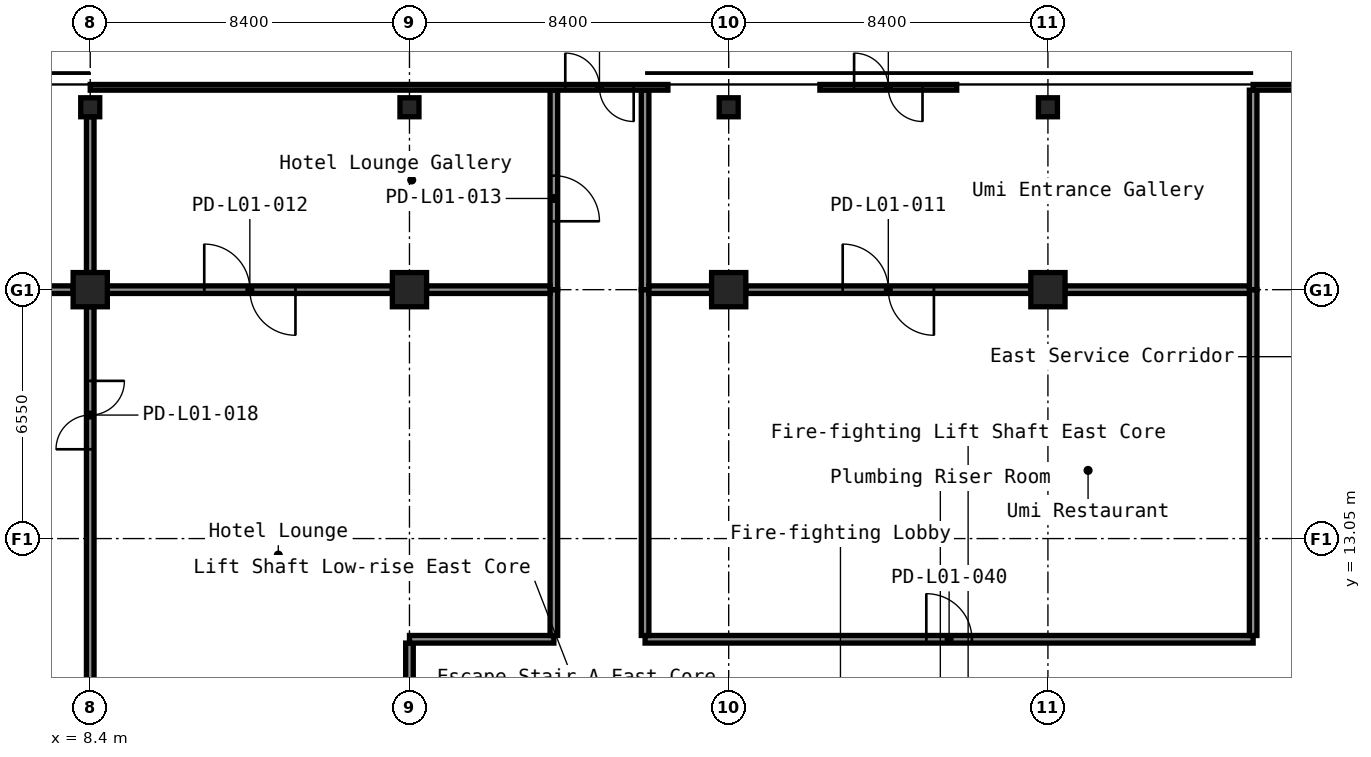
"""IFC4 building model, lengths in metres.
Left out: names, types, materials, properties, quantities, classifications, styles, units other than length and angle.
Written with IfcOpenShell. Run it as: python <this file> out.ifc"""

import sys

from ifc_helpers import new_model, si_unit, direction, frame, frame_2d, origin, origin_2d, place, context, subcontext, project, spatial, rectangle, hollow_rectangle, extrude, element, fill, save


model = new_model("IFC4")
c1 = context("Model", 3, precision=1e-05, world=origin(), true_north=direction((0.0, 1.0)))
c2 = subcontext(c1, "Body", "Model", "MODEL_VIEW")
j1 = project(units=[si_unit("LENGTHUNIT", "METRE"), si_unit("PLANEANGLEUNIT", "RADIAN")], contexts=[c1])
p1 = place(None, origin())
s1 = spatial("IfcSite", under=j1, at=p1, CompositionType="ELEMENT")
p2 = place(p1, origin())
s2 = spatial("IfcBuilding", under=s1, at=p2, CompositionType="ELEMENT")
p3 = place(p2, origin())
s3 = spatial("IfcBuildingStorey", under=s2, at=p3, CompositionType="ELEMENT", Elevation=0.0)
for number, where, z_axis, x_axis in (
    (1, (8.4, 19.6, -0.3), (0.0, 0.0, 1.0), (1.0, 0.0, 0.0)),
    (2, (16.8, 19.6, -0.3), (0.0, 0.0, 1.0), (1.0, 0.0, 0.0)),
    (3, (25.2, 19.6, -0.3), (0.0, 0.0, 1.0), (1.0, 0.0, 0.0)),
    (4, (33.6, 19.6, -0.3), (0.0, 0.0, 1.0), (1.0, 0.0, 0.0)),
):
    element("IfcColumn", number, at=place(p3, frame(where, z_axis=z_axis, x_axis=x_axis)), inside=s3, PredefinedType="COLUMN", context=c2, shape_type="SweptSolid", body=[
        extrude(hollow_rectangle(XDim=0.9, YDim=0.9, WallThickness=0.036, at=origin_2d()), origin(), (0.0, 0.0, 1.0), 8.9),
    ])
for number, where, z_axis, x_axis in (
    (5, (8.4, 24.4, -0.3), (0.0, 0.0, 1.0), (1.0, 0.0, 0.0)),
    (6, (16.8, 24.4, -0.3), (0.0, 0.0, 1.0), (1.0, 0.0, 0.0)),
    (7, (25.2, 24.4, -0.3), (0.0, 0.0, 1.0), (1.0, 0.0, 0.0)),
    (8, (33.6, 24.4, -0.3), (0.0, 0.0, 1.0), (1.0, 0.0, 0.0)),
):
    element("IfcColumn", number, at=place(p3, frame(where, z_axis=z_axis, x_axis=x_axis)), inside=s3, PredefinedType="COLUMN", context=c2, shape_type="SweptSolid", body=[
        extrude(hollow_rectangle(XDim=0.5, YDim=0.5, WallThickness=0.019, InnerFilletRadius=0.029, OuterFilletRadius=0.048, at=origin_2d()), origin(), (0.0, 0.0, 1.0), 8.9),
    ])
p4 = place(p3, frame((8.4, 24.15, 0.0), z_axis=(0.0, 0.0, 1.0), x_axis=(0.0, -1.0, 0.0)))
e9 = element("IfcWall", 9, at=p4, inside=s3, PredefinedType="PARTITIONING", context=c2, shape_type="SweptSolid", body=[
    extrude(rectangle(XDim=4.1, YDim=0.2, at=frame_2d((2.05, 0.0))), origin(), (0.0, 0.0, 1.0), 8.6),
])
p5 = place(p3, frame((16.8, 8.4, 0.0), z_axis=(0.0, 0.0, 1.0), x_axis=(0.0, 1.0, 0.0)))
e10 = element("IfcWall", 10, at=p5, inside=s3, PredefinedType="PARTITIONING", context=c2, shape_type="SweptSolid", body=[
    extrude(rectangle(XDim=1.9, YDim=0.2, at=frame_2d((0.95, 0.0))), origin(), (0.0, 0.0, 1.0), 8.6),
])
p6 = place(p3, frame((16.8, 10.4, 0.0), z_axis=(0.0, 0.0, 1.0), x_axis=(1.0, 0.0, 0.0)))
e11 = element("IfcWall", 11, at=p6, inside=s3, PredefinedType="PARTITIONING", context=c2, shape_type="SweptSolid", body=[
    extrude(rectangle(XDim=3.8, YDim=0.2, at=frame_2d((1.9, 0.0))), origin(), (0.0, 0.0, 1.0), 8.6),
])
p7 = place(p3, frame((20.6, 10.5, 0.0), z_axis=(0.0, 0.0, 1.0), x_axis=(0.0, 1.0, 0.0)))
e12 = element("IfcWall", 12, at=p7, inside=s3, PredefinedType="PARTITIONING", context=c2, shape_type="SweptSolid", body=[
    extrude(rectangle(XDim=9.1, YDim=0.2, at=frame_2d((4.55, 0.0))), origin(), (0.0, 0.0, 1.0), 8.6),
])
p8 = place(p3, frame((20.6, 19.6, 0.0), z_axis=(0.0, 0.0, 1.0), x_axis=(0.0, 1.0, 0.0)))
e13 = element("IfcWall", 13, at=p8, inside=s3, PredefinedType="PARTITIONING", context=c2, shape_type="SweptSolid", body=[
    extrude(rectangle(XDim=5.25, YDim=0.2, at=frame_2d((2.625, 0.0))), origin(), (0.0, 0.0, 1.0), 8.6),
])
p9 = place(p8, frame((1.8, 0.0, 0.0)))
e14 = element("IfcOpeningElement", 14, at=p9, cuts=e13, PredefinedType="OPENING", context=c2, shape_type="SweptSolid", body=[
    extrude(rectangle(XDim=1.2, YDim=2.1, at=frame_2d((0.6, 1.05))), frame((0.0, 0.11, 0.0), z_axis=(0.0, -1.0, 0.0), x_axis=(1.0, 0.0, 0.0)), (0.0, 0.0, 1.0), 0.22),
])
p10 = place(p3, frame((23.0, 10.4, 0.0), z_axis=(0.0, 0.0, 1.0), x_axis=(1.0, 0.0, 0.0)))
e15 = element("IfcWall", 15, at=p10, inside=s3, PredefinedType="PARTITIONING", context=c2, shape_type="SweptSolid", body=[
    extrude(rectangle(XDim=16.0, YDim=0.2, at=frame_2d((8.0, 0.0))), origin(), (0.0, 0.0, 1.0), 8.6),
])
p11 = place(p10, frame((7.4, 0.0, 0.0)))
e16 = element("IfcOpeningElement", 16, at=p11, cuts=e15, PredefinedType="OPENING", context=c2, shape_type="SweptSolid", body=[
    extrude(rectangle(XDim=1.2, YDim=2.1, at=frame_2d((0.6, 1.05))), frame((0.0, 0.11, 0.0), z_axis=(0.0, -1.0, 0.0), x_axis=(1.0, 0.0, 0.0)), (0.0, 0.0, 1.0), 0.22),
])
for number, where, z_axis, x_axis in (
    (17, (23.0, 19.6, 0.0), (0.0, 0.0, 1.0), (0.0, -1.0, 0.0)),
    (18, (39.0, 10.5, 0.0), (0.0, 0.0, 1.0), (0.0, 1.0, 0.0)),
):
    element("IfcWall", number, at=place(p3, frame(where, z_axis=z_axis, x_axis=x_axis)), inside=s3, PredefinedType="PARTITIONING", context=c2, shape_type="SweptSolid", body=[
        extrude(rectangle(XDim=9.1, YDim=0.2, at=frame_2d((4.55, 0.0))), origin(), (0.0, 0.0, 1.0), 8.6),
    ])
for number, where, z_axis, x_axis in (
    (19, (23.0, 24.85, 0.0), (0.0, 0.0, 1.0), (0.0, -1.0, 0.0)),
    (20, (39.0, 19.6, 0.0), (0.0, 0.0, 1.0), (0.0, 1.0, 0.0)),
):
    element("IfcWall", number, at=place(p3, frame(where, z_axis=z_axis, x_axis=x_axis)), inside=s3, PredefinedType="PARTITIONING", context=c2, shape_type="SweptSolid", body=[
        extrude(rectangle(XDim=5.25, YDim=0.2, at=frame_2d((2.625, 0.0))), origin(), (0.0, 0.0, 1.0), 8.6),
    ])
p12 = place(p3, frame((8.85, 19.6, 0.0), z_axis=(0.0, 0.0, 1.0), x_axis=(1.0, 0.0, 0.0)))
e21 = element("IfcWall", 21, at=p12, inside=s3, PredefinedType="PARTITIONING", context=c2, shape_type="SweptSolid", body=[
    extrude(rectangle(XDim=7.5, YDim=0.2, at=frame_2d((3.75, 0.0))), origin(), (0.0, 0.0, 1.0), 8.6),
])
p13 = place(p12, frame((2.55, 0.0, 0.0)))
e22 = element("IfcOpeningElement", 22, at=p13, cuts=e21, PredefinedType="OPENING", context=c2, shape_type="SweptSolid", body=[
    extrude(rectangle(XDim=2.4, YDim=2.1, at=frame_2d((1.2, 1.05))), frame((0.0, 0.11, 0.0), z_axis=(0.0, -1.0, 0.0), x_axis=(1.0, 0.0, 0.0)), (0.0, 0.0, 1.0), 0.22),
])
p14 = place(p3, frame((17.25, 19.6, 0.0), z_axis=(0.0, 0.0, 1.0), x_axis=(1.0, 0.0, 0.0)))
e23 = element("IfcWall", 23, at=p14, inside=s3, PredefinedType="PARTITIONING", context=c2, shape_type="SweptSolid", body=[
    extrude(rectangle(XDim=3.25, YDim=0.2, at=frame_2d((1.625, 0.0))), origin(), (0.0, 0.0, 1.0), 8.6),
])
p15 = place(p3, frame((0.45, 19.6, 0.0), z_axis=(0.0, 0.0, 1.0), x_axis=(1.0, 0.0, 0.0)))
e24 = element("IfcWall", 24, at=p15, inside=s3, PredefinedType="PARTITIONING", context=c2, shape_type="SweptSolid", body=[
    extrude(rectangle(XDim=7.5, YDim=0.2, at=frame_2d((3.75, 0.0))), origin(), (0.0, 0.0, 1.0), 8.6),
])
p16 = place(p15, frame((2.55, 0.0, 0.0)))
e25 = element("IfcOpeningElement", 25, at=p16, cuts=e24, PredefinedType="OPENING", context=c2, shape_type="SweptSolid", body=[
    extrude(rectangle(XDim=2.4, YDim=2.1, at=frame_2d((1.2, 1.05))), frame((0.0, 0.11, 0.0), z_axis=(0.0, -1.0, 0.0), x_axis=(1.0, 0.0, 0.0)), (0.0, 0.0, 1.0), 0.22),
])
p17 = place(p3, frame((8.4, 19.15, 0.0), z_axis=(0.0, 0.0, 1.0), x_axis=(0.0, -1.0, 0.0)))
e26 = element("IfcWall", 26, at=p17, inside=s3, PredefinedType="PARTITIONING", context=c2, shape_type="SweptSolid", body=[
    extrude(rectangle(XDim=12.15, YDim=0.2, at=frame_2d((6.075, 0.0))), origin(), (0.0, 0.0, 1.0), 8.6),
])
p18 = place(p17, frame((1.95, 0.0, 0.0)))
e27 = element("IfcOpeningElement", 27, at=p18, cuts=e26, PredefinedType="OPENING", context=c2, shape_type="SweptSolid", body=[
    extrude(rectangle(XDim=1.8, YDim=2.1, at=frame_2d((0.9, 1.05))), frame((0.0, 0.11, 0.0), z_axis=(0.0, -1.0, 0.0), x_axis=(1.0, 0.0, 0.0)), (0.0, 0.0, 1.0), 0.22),
])
p19 = place(p3, frame((23.1, 19.6, 0.0), z_axis=(0.0, 0.0, 1.0), x_axis=(1.0, 0.0, 0.0)))
e28 = element("IfcWall", 28, at=p19, inside=s3, PredefinedType="PARTITIONING", context=c2, shape_type="SweptSolid", body=[
    extrude(rectangle(XDim=1.65, YDim=0.2, at=frame_2d((0.825, 0.0))), origin(), (0.0, 0.0, 1.0), 8.6),
])
p20 = place(p3, frame((25.65, 19.6, 0.0), z_axis=(0.0, 0.0, 1.0), x_axis=(1.0, 0.0, 0.0)))
e29 = element("IfcWall", 29, at=p20, inside=s3, PredefinedType="PARTITIONING", context=c2, shape_type="SweptSolid", body=[
    extrude(rectangle(XDim=7.5, YDim=0.2, at=frame_2d((3.75, 0.0))), origin(), (0.0, 0.0, 1.0), 8.6),
])
p21 = place(p20, frame((2.55, 0.0, 0.0)))
e30 = element("IfcOpeningElement", 30, at=p21, cuts=e29, PredefinedType="OPENING", context=c2, shape_type="SweptSolid", body=[
    extrude(rectangle(XDim=2.4, YDim=2.1, at=frame_2d((1.2, 1.05))), frame((0.0, 0.11, 0.0), z_axis=(0.0, -1.0, 0.0), x_axis=(1.0, 0.0, 0.0)), (0.0, 0.0, 1.0), 0.22),
])
p22 = place(p3, frame((34.05, 19.6, 0.0), z_axis=(0.0, 0.0, 1.0), x_axis=(1.0, 0.0, 0.0)))
e31 = element("IfcWall", 31, at=p22, inside=s3, PredefinedType="PARTITIONING", context=c2, shape_type="SweptSolid", body=[
    extrude(rectangle(XDim=4.85, YDim=0.2, at=frame_2d((2.425, 0.0))), origin(), (0.0, 0.0, 1.0), 8.6),
])
p23 = place(p3, frame((8.4, 24.925, 0.0), z_axis=(0.0, 0.0, 1.0), x_axis=(1.0, 0.0, 0.0)))
e32 = element("IfcWall", 32, at=p23, inside=s3, PredefinedType="STANDARD", context=c2, shape_type="SweptSolid", body=[
    extrude(rectangle(XDim=15.2, YDim=0.15, at=frame_2d((7.6, 0.0))), origin(), (0.0, 0.0, 1.0), 8.6),
])
p24 = place(p23, frame((12.5, 0.0, 0.0)))
e33 = element("IfcOpeningElement", 33, at=p24, cuts=e32, PredefinedType="OPENING", context=c2, shape_type="SweptSolid", body=[
    extrude(rectangle(XDim=1.8, YDim=2.1, at=frame_2d((0.9, 1.05))), frame((0.0, 0.085, 0.0), z_axis=(0.0, -1.0, 0.0), x_axis=(1.0, 0.0, 0.0)), (0.0, 0.0, 1.0), 0.17),
])
p25 = place(p3, frame((27.6, 24.925, 0.0), z_axis=(0.0, 0.0, 1.0), x_axis=(1.0, 0.0, 0.0)))
e34 = element("IfcWall", 34, at=p25, inside=s3, PredefinedType="STANDARD", context=c2, shape_type="SweptSolid", body=[
    extrude(rectangle(XDim=3.6, YDim=0.15, at=frame_2d((1.8, 0.0))), origin(), (0.0, 0.0, 1.0), 8.6),
])
p26 = place(p25, frame((0.9, 0.0, 0.0)))
e35 = element("IfcOpeningElement", 35, at=p26, cuts=e34, PredefinedType="OPENING", context=c2, shape_type="SweptSolid", body=[
    extrude(rectangle(XDim=1.8, YDim=2.1, at=frame_2d((0.9, 1.05))), frame((0.0, 0.085, 0.0), z_axis=(0.0, -1.0, 0.0), x_axis=(1.0, 0.0, 0.0)), (0.0, 0.0, 1.0), 0.17),
])
p27 = place(p3, frame((39.0, 24.925, 0.0), z_axis=(0.0, 0.0, 1.0), x_axis=(1.0, 0.0, 0.0)))
e36 = element("IfcWall", 36, at=p27, inside=s3, PredefinedType="STANDARD", context=c2, shape_type="SweptSolid", body=[
    extrude(rectangle(XDim=12.98, YDim=0.15, at=frame_2d((6.49, 0.0))), origin(), (0.0, 0.0, 1.0), 8.6),
])
p28 = place(p27, frame((3.3, 0.0, 0.0)))
e37 = element("IfcOpeningElement", 37, at=p28, cuts=e36, PredefinedType="OPENING", context=c2, shape_type="SweptSolid", body=[
    extrude(rectangle(XDim=1.4, YDim=2.1, at=frame_2d((0.7, 1.05))), frame((0.0, 0.085, 0.0), z_axis=(0.0, -1.0, 0.0), x_axis=(1.0, 0.0, 0.0)), (0.0, 0.0, 1.0), 0.17),
])
p29 = place(p21, origin())
e38 = element("IfcDoor", 38, at=p29, inside=s3, OperationType="DOUBLE_DOOR_DOUBLE_SWING", PredefinedType="DOOR", context=c2, shape_type="SweptSolid", body=[
    extrude(rectangle(XDim=2.4, YDim=2.1, at=frame_2d((1.2, 1.05))), frame((0.0, 0.025, 0.0), z_axis=(0.0, -1.0, 0.0), x_axis=(1.0, 0.0, 0.0)), (0.0, 0.0, 1.0), 0.05),
])
fill(e30, e38)
p30 = place(p13, origin())
e39 = element("IfcDoor", 39, at=p30, inside=s3, OperationType="DOUBLE_DOOR_DOUBLE_SWING", PredefinedType="DOOR", context=c2, shape_type="SweptSolid", body=[
    extrude(rectangle(XDim=2.4, YDim=2.1, at=frame_2d((1.2, 1.05))), frame((0.0, 0.025, 0.0), z_axis=(0.0, -1.0, 0.0), x_axis=(1.0, 0.0, 0.0)), (0.0, 0.0, 1.0), 0.05),
])
fill(e22, e39)
p31 = place(p9, origin())
e40 = element("IfcDoor", 40, at=p31, inside=s3, OperationType="SINGLE_SWING_LEFT", PredefinedType="DOOR", context=c2, shape_type="SweptSolid", body=[
    extrude(rectangle(XDim=1.2, YDim=2.1, at=frame_2d((0.6, 1.05))), frame((0.0, 0.025, 0.0), z_axis=(0.0, -1.0, 0.0), x_axis=(1.0, 0.0, 0.0)), (0.0, 0.0, 1.0), 0.05),
])
fill(e14, e40)
p32 = place(p18, origin())
e41 = element("IfcDoor", 41, at=p32, inside=s3, OperationType="DOUBLE_DOOR_DOUBLE_SWING", PredefinedType="DOOR", context=c2, shape_type="SweptSolid", body=[
    extrude(rectangle(XDim=1.8, YDim=2.1, at=frame_2d((0.9, 1.05))), frame((0.0, 0.025, 0.0), z_axis=(0.0, -1.0, 0.0), x_axis=(1.0, 0.0, 0.0)), (0.0, 0.0, 1.0), 0.05),
])
fill(e27, e41)
p33 = place(p11, origin())
e42 = element("IfcDoor", 42, at=p33, inside=s3, OperationType="SINGLE_SWING_RIGHT", PredefinedType="DOOR", context=c2, shape_type="SweptSolid", body=[
    extrude(rectangle(XDim=1.2, YDim=2.1, at=frame_2d((0.6, 1.05))), frame((0.0, 0.025, 0.0), z_axis=(0.0, -1.0, 0.0), x_axis=(1.0, 0.0, 0.0)), (0.0, 0.0, 1.0), 0.05),
])
fill(e16, e42)
p34 = place(p26, origin())
e43 = element("IfcDoor", 43, at=p34, inside=s3, OperationType="DOUBLE_DOOR_DOUBLE_SWING", PredefinedType="DOOR", context=c2, shape_type="SweptSolid", body=[
    extrude(rectangle(XDim=1.8, YDim=2.1, at=frame_2d((0.9, 1.05))), frame((0.0, 0.025, 0.0), z_axis=(0.0, -1.0, 0.0), x_axis=(1.0, 0.0, 0.0)), (0.0, 0.0, 1.0), 0.05),
])
fill(e35, e43)
p35 = place(p24, origin())
e44 = element("IfcDoor", 44, at=p35, inside=s3, OperationType="DOUBLE_DOOR_SINGLE_SWING", PredefinedType="DOOR", context=c2, shape_type="SweptSolid", body=[
    extrude(rectangle(XDim=1.8, YDim=2.1, at=frame_2d((0.9, 1.05))), frame((0.0, 0.025, 0.0), z_axis=(0.0, -1.0, 0.0), x_axis=(1.0, 0.0, 0.0)), (0.0, 0.0, 1.0), 0.05),
])
fill(e33, e44)
save(model, sys.argv[1])
